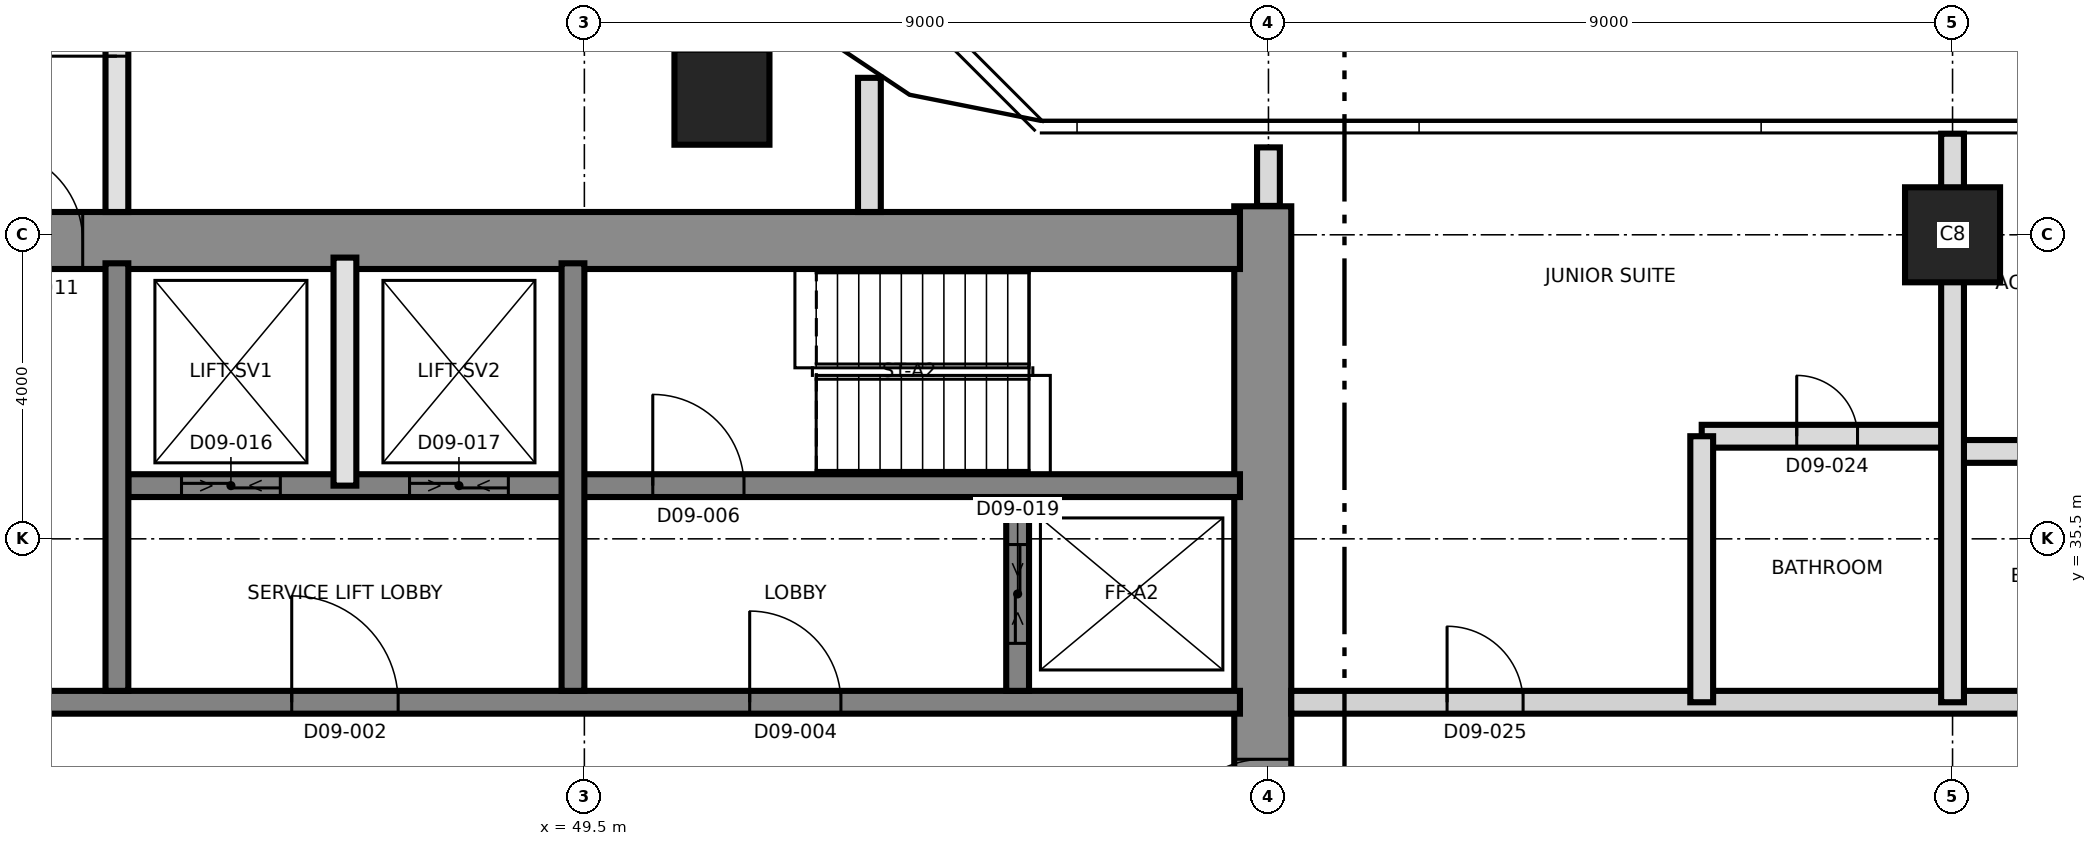
"""IFC4 building model, lengths in metres.
Left out: names, types, materials, properties, quantities, classifications, styles, units other than length and angle.
Written with IfcOpenShell. Run it as: python <this file> out.ifc"""

import sys

from ifc_helpers import new_model, si_unit, direction, frame, frame_2d, origin, origin_2d, place, context, subcontext, project, spatial, rectangle, extrude, element, fill, save


model = new_model("IFC4")
c1 = context("Model", 3, precision=1e-05, world=origin(), true_north=direction((0.0, 1.0)))
c2 = subcontext(c1, "Body", "Model", "MODEL_VIEW")
j1 = project(units=[si_unit("LENGTHUNIT", "METRE"), si_unit("PLANEANGLEUNIT", "RADIAN")], contexts=[c1])
p1 = place(None, origin())
s1 = spatial("IfcSite", under=j1, at=p1, CompositionType="ELEMENT")
p2 = place(p1, origin())
s2 = spatial("IfcBuilding", under=s1, at=p2, CompositionType="ELEMENT")
p3 = place(p2, frame((0.0, 0.0, 105.6)))
s3 = spatial("IfcBuildingStorey", under=s2, at=p3, CompositionType="ELEMENT", Elevation=105.6)
p4 = place(p3, frame((58.425, 21.125, 0.0), z_axis=(0.0, 0.0, 1.0), x_axis=(0.0, 1.0, 0.0)))
e1 = element("IfcWall", 1, at=p4, inside=s3, PredefinedType="SHEAR", context=c2, shape_type="SweptSolid", body=[
    extrude(rectangle(XDim=18.75, YDim=0.75, at=frame_2d((9.375, 0.0))), origin(), (0.0, 0.0, 1.0), 3.7),
])
p5 = place(p4, frame((10.275, 0.0, 0.0)))
e2 = element("IfcOpeningElement", 2, at=p5, cuts=e1, PredefinedType="OPENING", context=c2, shape_type="SweptSolid", body=[
    extrude(rectangle(XDim=1.2, YDim=2.1, at=frame_2d((0.6, 1.05))), frame((0.0, 0.385, 0.0), z_axis=(0.0, -1.0, 0.0), x_axis=(1.0, 0.0, 0.0)), (0.0, 0.0, 1.0), 0.77),
])
p6 = place(p3, frame((31.125, 39.425, 0.0), z_axis=(0.0, 0.0, 1.0), x_axis=(1.0, 0.0, 0.0)))
e3 = element("IfcWall", 3, at=p6, inside=s3, PredefinedType="SHEAR", context=c2, shape_type="SweptSolid", body=[
    extrude(rectangle(XDim=27.0, YDim=0.75, at=frame_2d((13.5, 0.0))), origin(), (0.0, 0.0, 1.0), 3.7),
])
p7 = place(p6, frame((10.575, 0.0, 0.0)))
e4 = element("IfcOpeningElement", 4, at=p7, cuts=e3, PredefinedType="OPENING", context=c2, shape_type="SweptSolid", body=[
    extrude(rectangle(XDim=1.2, YDim=2.1, at=frame_2d((0.6, 1.05))), frame((0.0, 0.385, 0.0), z_axis=(0.0, -1.0, 0.0), x_axis=(1.0, 0.0, 0.0)), (0.0, 0.0, 1.0), 0.77),
])
p8 = place(p3, frame((31.875, 33.35, 0.0), z_axis=(0.0, 0.0, 1.0), x_axis=(1.0, 0.0, 0.0)))
e5 = element("IfcWall", 5, at=p8, inside=s3, PredefinedType="SHEAR", context=c2, shape_type="SweptSolid", body=[
    extrude(rectangle(XDim=26.25, YDim=0.3, at=frame_2d((13.125, 0.0))), origin(), (0.0, 0.0, 1.0), 3.7),
])
p9 = place(p8, frame((13.775, 0.0, 0.0)))
e6 = element("IfcOpeningElement", 6, at=p9, cuts=e5, PredefinedType="OPENING", context=c2, shape_type="SweptSolid", body=[
    extrude(rectangle(XDim=1.4, YDim=2.1, at=frame_2d((0.7, 1.05))), frame((0.0, 0.16, 0.0), z_axis=(0.0, -1.0, 0.0), x_axis=(1.0, 0.0, 0.0)), (0.0, 0.0, 1.0), 0.32),
])
p10 = place(p8, frame((5.25, 0.0, 0.0)))
e7 = element("IfcOpeningElement", 7, at=p10, cuts=e5, PredefinedType="OPENING", context=c2, shape_type="SweptSolid", body=[
    extrude(rectangle(XDim=1.2, YDim=2.1, at=frame_2d((0.6, 1.05))), frame((0.0, 0.16, 0.0), z_axis=(0.0, -1.0, 0.0), x_axis=(1.0, 0.0, 0.0)), (0.0, 0.0, 1.0), 0.32),
])
p11 = place(p8, frame((19.8, 0.0, 0.0)))
e8 = element("IfcOpeningElement", 8, at=p11, cuts=e5, PredefinedType="OPENING", context=c2, shape_type="SweptSolid", body=[
    extrude(rectangle(XDim=1.2, YDim=2.1, at=frame_2d((0.6, 1.05))), frame((0.0, 0.16, 0.0), z_axis=(0.0, -1.0, 0.0), x_axis=(1.0, 0.0, 0.0)), (0.0, 0.0, 1.0), 0.32),
])
p12 = place(p3, frame((43.5, 36.2, 0.0), z_axis=(0.0, 0.0, 1.0), x_axis=(1.0, 0.0, 0.0)))
e9 = element("IfcWall", 9, at=p12, inside=s3, PredefinedType="SHEAR", context=c2, shape_type="SweptSolid", body=[
    extrude(rectangle(XDim=14.625, YDim=0.3, at=frame_2d((7.312, 0.0))), origin(), (0.0, 0.0, 1.0), 3.7),
])
p13 = place(p12, frame((6.9, 0.0, 0.0)))
e10 = element("IfcOpeningElement", 10, at=p13, cuts=e9, PredefinedType="OPENING", context=c2, shape_type="SweptSolid", body=[
    extrude(rectangle(XDim=1.2, YDim=2.1, at=frame_2d((0.6, 1.05))), frame((0.0, 0.16, 0.0), z_axis=(0.0, -1.0, 0.0), x_axis=(1.0, 0.0, 0.0)), (0.0, 0.0, 1.0), 0.32),
])
p14 = place(p12, frame((0.7, 0.0, 0.0)))
e11 = element("IfcOpeningElement", 11, at=p14, cuts=e9, PredefinedType="OPENING", context=c2, shape_type="SweptSolid", body=[
    extrude(rectangle(XDim=1.3, YDim=2.4, at=frame_2d((0.65, 1.2))), frame((0.0, 0.16, 0.0), z_axis=(0.0, -1.0, 0.0), x_axis=(1.0, 0.0, 0.0)), (0.0, 0.0, 1.0), 0.32),
])
p15 = place(p12, frame((3.7, 0.0, 0.0)))
e12 = element("IfcOpeningElement", 12, at=p15, cuts=e9, PredefinedType="OPENING", context=c2, shape_type="SweptSolid", body=[
    extrude(rectangle(XDim=1.3, YDim=2.4, at=frame_2d((0.65, 1.2))), frame((0.0, 0.16, 0.0), z_axis=(0.0, -1.0, 0.0), x_axis=(1.0, 0.0, 0.0)), (0.0, 0.0, 1.0), 0.32),
])
for number, where, z_axis, x_axis in (
    (13, (43.35, 33.5, 0.0), (0.0, 0.0, 1.0), (0.0, 1.0, 0.0)),
    (14, (49.35, 33.5, 0.0), (0.0, 0.0, 1.0), (0.0, 1.0, 0.0)),
):
    element("IfcWall", number, at=place(p3, frame(where, z_axis=z_axis, x_axis=x_axis)), inside=s3, PredefinedType="SHEAR", context=c2, shape_type="SweptSolid", body=[
        extrude(rectangle(XDim=5.625, YDim=0.3, at=frame_2d((2.812, 0.0))), origin(), (0.0, 0.0, 1.0), 3.7),
    ])
p16 = place(p3, frame((55.2, 33.5, 0.0), z_axis=(0.0, 0.0, 1.0), x_axis=(0.0, 1.0, 0.0)))
e15 = element("IfcWall", 15, at=p16, inside=s3, PredefinedType="SHEAR", context=c2, shape_type="SweptSolid", body=[
    extrude(rectangle(XDim=2.55, YDim=0.3, at=frame_2d((1.275, 0.0))), origin(), (0.0, 0.0, 1.0), 3.7),
])
p17 = place(p16, frame((0.625, 0.0, 0.0)))
e16 = element("IfcOpeningElement", 16, at=p17, cuts=e15, PredefinedType="OPENING", context=c2, shape_type="SweptSolid", body=[
    extrude(rectangle(XDim=1.3, YDim=2.4, at=frame_2d((0.65, 1.2))), frame((0.0, 0.16, 0.0), z_axis=(0.0, -1.0, 0.0), x_axis=(1.0, 0.0, 0.0)), (0.0, 0.0, 1.0), 0.32),
])
for number, where, z_axis, x_axis in (
    (17, (67.5, 39.5, 0.0), (0.0, 0.0, 1.0), (1.0, 0.0, 0.0)),
    (18, (51.31, 41.31, 0.0), (0.0, 0.0, 1.0), (1.0, 0.0, 0.0)),
):
    element("IfcColumn", number, at=place(p3, frame(where, z_axis=z_axis, x_axis=x_axis)), inside=s3, PredefinedType="COLUMN", context=c2, shape_type="SweptSolid", body=[
        extrude(rectangle(XDim=1.25, YDim=1.25, at=origin_2d()), origin(), (0.0, 0.0, 1.0), 3.7),
    ])
p18 = place(p3, frame((46.35, 36.2, 0.0), z_axis=(0.0, 0.0, 1.0), x_axis=(0.0, 1.0, 0.0)))
e19 = element("IfcWall", 19, at=p18, inside=s3, PredefinedType="SOLIDWALL", context=c2, shape_type="SweptSolid", body=[
    extrude(rectangle(XDim=3.0, YDim=0.3, at=frame_2d((1.5, 0.0))), origin(), (0.0, 0.0, 1.0), 3.4),
])
p19 = place(p3, frame((58.8, 33.35, 0.0), z_axis=(0.0, 0.0, 1.0), x_axis=(1.0, 0.0, 0.0)))
e20 = element("IfcWall", 20, at=p19, inside=s3, PredefinedType="PARTITIONING", context=c2, shape_type="SweptSolid", body=[
    extrude(rectangle(XDim=26.53, YDim=0.3, at=frame_2d((13.265, 0.0))), origin(), (0.0, 0.0, 1.0), 3.4),
])
p20 = place(p19, frame((2.05, 0.0, 0.0)))
e21 = element("IfcOpeningElement", 21, at=p20, cuts=e20, PredefinedType="OPENING", context=c2, shape_type="SweptSolid", body=[
    extrude(rectangle(XDim=1.0, YDim=2.4, at=frame_2d((0.5, 1.2))), frame((0.0, 0.16, 0.0), z_axis=(0.0, -1.0, 0.0), x_axis=(1.0, 0.0, 0.0)), (0.0, 0.0, 1.0), 0.32),
])
p21 = place(p19, frame((11.95, 0.0, 0.0)))
e22 = element("IfcOpeningElement", 22, at=p21, cuts=e20, PredefinedType="OPENING", context=c2, shape_type="SweptSolid", body=[
    extrude(rectangle(XDim=1.0, YDim=2.1, at=frame_2d((0.5, 1.05))), frame((0.0, 0.16, 0.0), z_axis=(0.0, -1.0, 0.0), x_axis=(1.0, 0.0, 0.0)), (0.0, 0.0, 1.0), 0.32),
])
p22 = place(p19, frame((13.6, 0.0, 0.0)))
e23 = element("IfcOpeningElement", 23, at=p22, cuts=e20, PredefinedType="OPENING", context=c2, shape_type="SweptSolid", body=[
    extrude(rectangle(XDim=1.0, YDim=2.1, at=frame_2d((0.5, 1.05))), frame((0.0, 0.16, 0.0), z_axis=(0.0, -1.0, 0.0), x_axis=(1.0, 0.0, 0.0)), (0.0, 0.0, 1.0), 0.32),
])
p23 = place(p19, frame((21.7, 0.0, 0.0)))
e24 = element("IfcOpeningElement", 24, at=p23, cuts=e20, PredefinedType="OPENING", context=c2, shape_type="SweptSolid", body=[
    extrude(rectangle(XDim=1.0, YDim=2.4, at=frame_2d((0.5, 1.2))), frame((0.0, 0.16, 0.0), z_axis=(0.0, -1.0, 0.0), x_axis=(1.0, 0.0, 0.0)), (0.0, 0.0, 1.0), 0.32),
])
p24 = place(p3, frame((67.5, 36.65, 0.0), z_axis=(0.0, 0.0, 1.0), x_axis=(1.0, 0.0, 0.0)))
e25 = element("IfcWall", 25, at=p24, inside=s3, PredefinedType="PARTITIONING", context=c2, shape_type="SweptSolid", body=[
    extrude(rectangle(XDim=3.0, YDim=0.3, at=frame_2d((1.5, 0.0))), origin(), (0.0, 0.0, 1.0), 3.4),
])
p25 = place(p24, frame((1.1, 0.0, 0.0)))
e26 = element("IfcOpeningElement", 26, at=p25, cuts=e25, PredefinedType="OPENING", context=c2, shape_type="SweptSolid", body=[
    extrude(rectangle(XDim=0.8, YDim=2.1, at=frame_2d((0.4, 1.05))), frame((0.0, 0.16, 0.0), z_axis=(0.0, -1.0, 0.0), x_axis=(1.0, 0.0, 0.0)), (0.0, 0.0, 1.0), 0.32),
])
p26 = place(p3, frame((64.2, 36.85, 0.0), z_axis=(0.0, 0.0, 1.0), x_axis=(1.0, 0.0, 0.0)))
e27 = element("IfcWall", 27, at=p26, inside=s3, PredefinedType="PARTITIONING", context=c2, shape_type="SweptSolid", body=[
    extrude(rectangle(XDim=3.3, YDim=0.3, at=frame_2d((1.65, 0.0))), origin(), (0.0, 0.0, 1.0), 3.4),
])
p27 = place(p26, frame((1.25, 0.0, 0.0)))
e28 = element("IfcOpeningElement", 28, at=p27, cuts=e27, PredefinedType="OPENING", context=c2, shape_type="SweptSolid", body=[
    extrude(rectangle(XDim=0.8, YDim=2.1, at=frame_2d((0.4, 1.05))), frame((0.0, 0.16, 0.0), z_axis=(0.0, -1.0, 0.0), x_axis=(1.0, 0.0, 0.0)), (0.0, 0.0, 1.0), 0.32),
])
p28 = place(p3, frame((43.35, 39.8, 0.0), z_axis=(0.0, 0.0, 1.0), x_axis=(0.0, 1.0, 0.0)))
e29 = element("IfcWall", 29, at=p28, inside=s3, PredefinedType="SOLIDWALL", context=c2, shape_type="SweptSolid", body=[
    extrude(rectangle(XDim=26.0, YDim=0.3, at=frame_2d((13.0, 0.0))), origin(), (0.0, 0.0, 1.0), 3.4),
])
p29 = place(p28, frame((2.05, 0.0, 0.0)))
e30 = element("IfcOpeningElement", 30, at=p29, cuts=e29, PredefinedType="OPENING", context=c2, shape_type="SweptSolid", body=[
    extrude(rectangle(XDim=1.0, YDim=2.4, at=frame_2d((0.5, 1.2))), frame((0.0, 0.16, 0.0), z_axis=(0.0, -1.0, 0.0), x_axis=(1.0, 0.0, 0.0)), (0.0, 0.0, 1.0), 0.32),
])
p30 = place(p28, frame((14.35, 0.0, 0.0)))
e31 = element("IfcOpeningElement", 31, at=p30, cuts=e29, PredefinedType="OPENING", context=c2, shape_type="SweptSolid", body=[
    extrude(rectangle(XDim=1.0, YDim=2.4, at=frame_2d((0.5, 1.2))), frame((0.0, 0.16, 0.0), z_axis=(0.0, -1.0, 0.0), x_axis=(1.0, 0.0, 0.0)), (0.0, 0.0, 1.0), 0.32),
])
p31 = place(p28, frame((21.25, 0.0, 0.0)))
e32 = element("IfcOpeningElement", 32, at=p31, cuts=e29, PredefinedType="OPENING", context=c2, shape_type="SweptSolid", body=[
    extrude(rectangle(XDim=1.0, YDim=2.4, at=frame_2d((0.5, 1.2))), frame((0.0, 0.16, 0.0), z_axis=(0.0, -1.0, 0.0), x_axis=(1.0, 0.0, 0.0)), (0.0, 0.0, 1.0), 0.32),
])
p32 = place(p3, frame((53.25, 39.8, 0.0), z_axis=(0.0, 0.0, 1.0), x_axis=(0.0, 1.0, 0.0)))
e33 = element("IfcWall", 33, at=p32, inside=s3, PredefinedType="PARTITIONING", context=c2, shape_type="SweptSolid", body=[
    extrude(rectangle(XDim=1.765, YDim=0.3, at=frame_2d((0.882, 0.0))), origin(), (0.0, 0.0, 1.0), 3.4),
])
p33 = place(p3, frame((58.5, 39.88, 0.0), z_axis=(0.0, 0.0, 1.0), x_axis=(0.0, 1.0, 0.0)))
e34 = element("IfcWall", 34, at=p33, inside=s3, PredefinedType="PARTITIONING", context=c2, shape_type="SweptSolid", body=[
    extrude(rectangle(XDim=0.77, YDim=0.3, at=frame_2d((0.385, 0.0))), origin(), (0.0, 0.0, 1.0), 3.4),
])
p34 = place(p3, frame((64.2, 33.35, 0.0), z_axis=(0.0, 0.0, 1.0), x_axis=(0.0, 1.0, 0.0)))
e35 = element("IfcWall", 35, at=p34, inside=s3, PredefinedType="PARTITIONING", context=c2, shape_type="SweptSolid", body=[
    extrude(rectangle(XDim=3.5, YDim=0.3, at=frame_2d((1.75, 0.0))), origin(), (0.0, 0.0, 1.0), 3.4),
])
p35 = place(p3, frame((67.5, 33.35, 0.0), z_axis=(0.0, 0.0, 1.0), x_axis=(0.0, 1.0, 0.0)))
e36 = element("IfcWall", 36, at=p35, inside=s3, PredefinedType="PARTITIONING", context=c2, shape_type="SweptSolid", body=[
    extrude(rectangle(XDim=7.48, YDim=0.3, at=frame_2d((3.74, 0.0))), origin(), (0.0, 0.0, 1.0), 3.4),
])
p36 = place(p9, origin())
e37 = element("IfcDoor", 37, at=p36, inside=s3, OperationType="SINGLE_SWING_RIGHT", PredefinedType="DOOR", context=c2, shape_type="SweptSolid", body=[
    extrude(rectangle(XDim=1.4, YDim=2.1, at=frame_2d((0.7, 1.05))), frame((0.0, 0.025, 0.0), z_axis=(0.0, -1.0, 0.0), x_axis=(1.0, 0.0, 0.0)), (0.0, 0.0, 1.0), 0.05),
])
fill(e6, e37)
p37 = place(p11, origin())
e38 = element("IfcDoor", 38, at=p37, inside=s3, OperationType="SINGLE_SWING_RIGHT", PredefinedType="DOOR", context=c2, shape_type="SweptSolid", body=[
    extrude(rectangle(XDim=1.2, YDim=2.1, at=frame_2d((0.6, 1.05))), frame((0.0, 0.025, 0.0), z_axis=(0.0, -1.0, 0.0), x_axis=(1.0, 0.0, 0.0)), (0.0, 0.0, 1.0), 0.05),
])
fill(e8, e38)
p38 = place(p13, origin())
e39 = element("IfcDoor", 39, at=p38, inside=s3, OperationType="SINGLE_SWING_LEFT", PredefinedType="DOOR", context=c2, shape_type="SweptSolid", body=[
    extrude(rectangle(XDim=1.2, YDim=2.1, at=frame_2d((0.6, 1.05))), frame((0.0, 0.025, 0.0), z_axis=(0.0, -1.0, 0.0), x_axis=(1.0, 0.0, 0.0)), (0.0, 0.0, 1.0), 0.05),
])
fill(e10, e39)
p39 = place(p5, origin())
e40 = element("IfcDoor", 40, at=p39, inside=s3, OperationType="SINGLE_SWING_LEFT", PredefinedType="DOOR", context=c2, shape_type="SweptSolid", body=[
    extrude(rectangle(XDim=1.2, YDim=2.1, at=frame_2d((0.6, 1.05))), frame((0.0, 0.025, 0.0), z_axis=(0.0, -1.0, 0.0), x_axis=(1.0, 0.0, 0.0)), (0.0, 0.0, 1.0), 0.05),
])
fill(e2, e40)
p40 = place(p7, origin())
e41 = element("IfcDoor", 41, at=p40, inside=s3, OperationType="SINGLE_SWING_RIGHT", PredefinedType="DOOR", context=c2, shape_type="SweptSolid", body=[
    extrude(rectangle(XDim=1.2, YDim=2.1, at=frame_2d((0.6, 1.05))), frame((0.0, 0.025, 0.0), z_axis=(0.0, -1.0, 0.0), x_axis=(1.0, 0.0, 0.0)), (0.0, 0.0, 1.0), 0.05),
])
fill(e4, e41)
p41 = place(p14, origin())
e42 = element("IfcDoor", 42, at=p41, inside=s3, OperationType="SLIDING_TO_LEFT", PredefinedType="DOOR", context=c2, shape_type="SweptSolid", body=[
    extrude(rectangle(XDim=1.3, YDim=2.4, at=frame_2d((0.65, 1.2))), frame((0.0, 0.025, 0.0), z_axis=(0.0, -1.0, 0.0), x_axis=(1.0, 0.0, 0.0)), (0.0, 0.0, 1.0), 0.05),
])
fill(e11, e42)
p42 = place(p15, origin())
e43 = element("IfcDoor", 43, at=p42, inside=s3, OperationType="SLIDING_TO_LEFT", PredefinedType="DOOR", context=c2, shape_type="SweptSolid", body=[
    extrude(rectangle(XDim=1.3, YDim=2.4, at=frame_2d((0.65, 1.2))), frame((0.0, 0.025, 0.0), z_axis=(0.0, -1.0, 0.0), x_axis=(1.0, 0.0, 0.0)), (0.0, 0.0, 1.0), 0.05),
])
fill(e12, e43)
p43 = place(p17, origin())
e44 = element("IfcDoor", 44, at=p43, inside=s3, OperationType="SLIDING_TO_LEFT", PredefinedType="DOOR", context=c2, shape_type="SweptSolid", body=[
    extrude(rectangle(XDim=1.3, YDim=2.4, at=frame_2d((0.65, 1.2))), frame((0.0, 0.025, 0.0), z_axis=(0.0, -1.0, 0.0), x_axis=(1.0, 0.0, 0.0)), (0.0, 0.0, 1.0), 0.05),
])
fill(e16, e44)
p44 = place(p27, origin())
e45 = element("IfcDoor", 45, at=p44, inside=s3, OperationType="SINGLE_SWING_LEFT", PredefinedType="DOOR", context=c2, shape_type="SweptSolid", body=[
    extrude(rectangle(XDim=0.8, YDim=2.1, at=frame_2d((0.4, 1.05))), frame((0.0, 0.025, 0.0), z_axis=(0.0, -1.0, 0.0), x_axis=(1.0, 0.0, 0.0)), (0.0, 0.0, 1.0), 0.05),
])
fill(e28, e45)
p45 = place(p20, origin())
e46 = element("IfcDoor", 46, at=p45, inside=s3, OperationType="SINGLE_SWING_LEFT", PredefinedType="DOOR", context=c2, shape_type="SweptSolid", body=[
    extrude(rectangle(XDim=1.0, YDim=2.4, at=frame_2d((0.5, 1.2))), frame((0.0, 0.025, 0.0), z_axis=(0.0, -1.0, 0.0), x_axis=(1.0, 0.0, 0.0)), (0.0, 0.0, 1.0), 0.05),
])
fill(e21, e46)
p46 = place(p29, origin())
e47 = element("IfcDoor", 47, at=p46, inside=s3, OperationType="SINGLE_SWING_LEFT", PredefinedType="DOOR", context=c2, shape_type="SweptSolid", body=[
    extrude(rectangle(XDim=1.0, YDim=2.4, at=frame_2d((0.5, 1.2))), frame((0.0, 0.025, 0.0), z_axis=(0.0, -1.0, 0.0), x_axis=(1.0, 0.0, 0.0)), (0.0, 0.0, 1.0), 0.05),
])
fill(e30, e47)
save(model, sys.argv[1])
